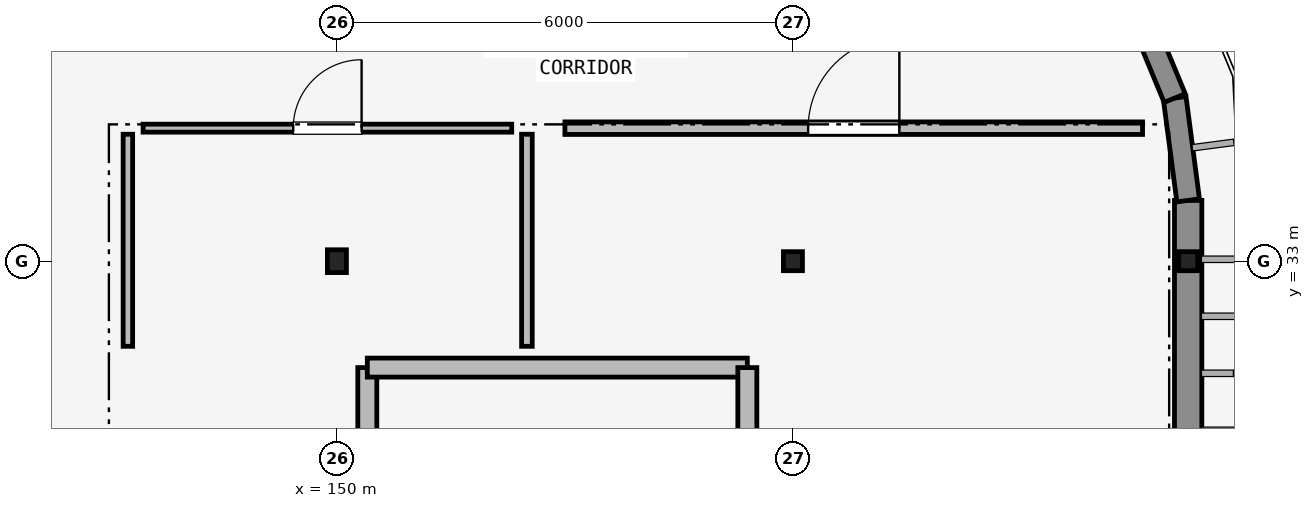
"""IFC4 building model, lengths in metres.
Left out: names, types, materials, properties, quantities, classifications, styles, units other than length and angle.
Written with IfcOpenShell. Run it as: python <this file> out.ifc"""

import sys

from ifc_helpers import new_model, si_unit, direction, frame, frame_2d, origin, origin_2d, place, context, subcontext, project, spatial, rectangle, hollow_rectangle, i_section, extrude, element, fill, save


model = new_model("IFC4")
c1 = context("Model", 3, precision=1e-05, world=origin(), true_north=direction((0.0, 1.0)))
c2 = subcontext(c1, "Body", "Model", "MODEL_VIEW")
j1 = project(units=[si_unit("LENGTHUNIT", "METRE"), si_unit("PLANEANGLEUNIT", "RADIAN")], contexts=[c1])
p1 = place(None, origin())
s1 = spatial("IfcSite", under=j1, at=p1, CompositionType="ELEMENT")
p2 = place(p1, origin())
s2 = spatial("IfcBuilding", under=s1, at=p2, CompositionType="ELEMENT")
p3 = place(p2, frame((0.0, 0.0, 26.1)))
s3 = spatial("IfcBuildingStorey", under=s2, at=p3, CompositionType="ELEMENT", Elevation=26.1)
p4 = place(p3, frame((150.0, 33.0, 0.0), z_axis=(0.0, 0.0, 1.0), x_axis=(1.0, 0.0, 0.0)))
e1 = element("IfcColumn", 1, at=p4, inside=s3, PredefinedType="COLUMN", context=c2, shape_type="SweptSolid", body=[
    extrude(i_section(OverallWidth=0.25, OverallDepth=0.3, WebThickness=0.01, FlangeThickness=0.01, FilletRadius=0.012, at=origin_2d()), origin(), (0.0, 0.0, 1.0), 3.9),
])
for number, where, z_axis, x_axis in (
    (2, (156.0, 33.0, 0.0), (0.0, 0.0, 1.0), (1.0, 0.0, 0.0)),
    (3, (161.2, 33.0, 0.0), (0.0, 0.0, 1.0), (1.0, 0.0, 0.0)),
):
    element("IfcColumn", number, at=place(p3, frame(where, z_axis=z_axis, x_axis=x_axis)), inside=s3, PredefinedType="COLUMN", context=c2, shape_type="SweptSolid", body=[
        extrude(hollow_rectangle(XDim=0.25, YDim=0.25, WallThickness=0.012, InnerFilletRadius=0.012, OuterFilletRadius=0.024, at=origin_2d()), origin(), (0.0, 0.0, 1.0), 3.9),
    ])
p5 = place(p3, frame((161.2, 30.0, 0.0), z_axis=(0.0, 0.0, 1.0), x_axis=(0.0, 1.0, 0.0)))
e4 = element("IfcWall", 4, at=p5, inside=s3, PredefinedType="SOLIDWALL", context=c2, shape_type="SweptSolid", body=[
    extrude(rectangle(XDim=3.8, YDim=0.36, at=frame_2d((1.9, 0.0))), origin(), (0.0, 0.0, 1.0), 3.13),
])
p6 = place(p3, frame((161.2, 33.8, 0.0), z_axis=(0.0, 0.0, 1.0), x_axis=(-0.130561507967, 0.991440211328, 0.0)))
e5 = element("IfcWall", 5, at=p6, inside=s3, PredefinedType="SOLIDWALL", context=c2, shape_type="SweptSolid", body=[
    extrude(rectangle(XDim=1.358, YDim=0.3, at=frame_2d((0.679, 0.0))), origin(), (0.0, 0.0, 1.0), 3.28),
])
p7 = place(p3, frame((161.023, 35.146, 0.0), z_axis=(0.0, 0.0, 1.0), x_axis=(-0.382621882407, 0.923905024937, 0.0)))
e6 = element("IfcWall", 6, at=p7, inside=s3, PredefinedType="SOLIDWALL", context=c2, shape_type="SweptSolid", body=[
    extrude(rectangle(XDim=1.357, YDim=0.3, at=frame_2d((0.679, 0.0))), origin(), (0.0, 0.0, 1.0), 3.28),
])
p8 = place(p3, frame((150.4, 26.55, 0.0), z_axis=(0.0, 0.0, 1.0), x_axis=(0.0, 1.0, 0.0)))
e7 = element("IfcWall", 7, at=p8, inside=s3, PredefinedType="PARTITIONING", context=c2, shape_type="SweptSolid", body=[
    extrude(rectangle(XDim=5.05, YDim=0.25, at=frame_2d((2.525, 0.0))), origin(), (0.0, 0.0, 1.0), 3.08),
])
p9 = place(p8, frame((1.775, 0.0, 0.0)))
e8 = element("IfcOpeningElement", 8, at=p9, cuts=e7, PredefinedType="OPENING", context=c2, shape_type="SweptSolid", body=[
    extrude(rectangle(XDim=1.5, YDim=2.15, at=frame_2d((0.75, 1.075))), frame((0.0, 0.135, 0.0), z_axis=(0.0, -1.0, 0.0), x_axis=(1.0, 0.0, 0.0)), (0.0, 0.0, 1.0), 0.27),
])
p10 = place(p3, frame((150.4, 31.6, 0.0), z_axis=(0.0, 0.0, 1.0), x_axis=(1.0, 0.0, 0.0)))
e9 = element("IfcWall", 9, at=p10, inside=s3, PredefinedType="PARTITIONING", context=c2, shape_type="SweptSolid", body=[
    extrude(rectangle(XDim=5.0, YDim=0.25, at=frame_2d((2.5, 0.0))), origin(), (0.0, 0.0, 1.0), 3.28),
])
p11 = place(p3, frame((155.4, 30.4, 0.0), z_axis=(0.0, 0.0, 1.0), x_axis=(0.0, 1.0, 0.0)))
e10 = element("IfcWall", 10, at=p11, inside=s3, PredefinedType="PARTITIONING", context=c2, shape_type="SweptSolid", body=[
    extrude(rectangle(XDim=1.2, YDim=0.25, at=frame_2d((0.6, 0.0))), origin(), (0.0, 0.0, 1.0), 3.68),
])
p12 = place(p3, frame((147.45, 34.75, 0.0), z_axis=(0.0, 0.0, 1.0), x_axis=(1.0, 0.0, 0.0)))
e11 = element("IfcWall", 11, at=p12, inside=s3, PredefinedType="PARTITIONING", context=c2, shape_type="SweptSolid", body=[
    extrude(rectangle(XDim=4.85, YDim=0.105, at=frame_2d((2.425, 0.0))), origin(), (0.0, 0.0, 1.0), 3.28),
])
p13 = place(p12, frame((1.975, 0.0, 0.0)))
e12 = element("IfcOpeningElement", 12, at=p13, cuts=e11, PredefinedType="OPENING", context=c2, shape_type="SweptSolid", body=[
    extrude(rectangle(XDim=0.9, YDim=2.1, at=frame_2d((0.45, 1.05))), frame((0.0, 0.062, 0.0), z_axis=(0.0, -1.0, 0.0), x_axis=(1.0, 0.0, 0.0)), (0.0, 0.0, 1.0), 0.125),
])
p14 = place(p3, frame((153.0, 34.75, 0.0), z_axis=(0.0, 0.0, 1.0), x_axis=(1.0, 0.0, 0.0)))
e13 = element("IfcWall", 13, at=p14, inside=s3, PredefinedType="PARTITIONING", context=c2, shape_type="SweptSolid", body=[
    extrude(rectangle(XDim=7.6, YDim=0.165, at=frame_2d((3.8, 0.0))), origin(), (0.0, 0.0, 1.0), 3.28),
])
p15 = place(p14, frame((3.2, 0.0, 0.0)))
e14 = element("IfcOpeningElement", 14, at=p15, cuts=e13, PredefinedType="OPENING", context=c2, shape_type="SweptSolid", body=[
    extrude(rectangle(XDim=1.2, YDim=2.15, at=frame_2d((0.6, 1.075))), frame((0.0, 0.093, 0.0), z_axis=(0.0, -1.0, 0.0), x_axis=(1.0, 0.0, 0.0)), (0.0, 0.0, 1.0), 0.185),
])
p16 = place(p3, frame((152.5, 34.67, 0.0), z_axis=(0.0, 0.0, 1.0), x_axis=(0.0, -1.0, 0.0)))
e15 = element("IfcWall", 15, at=p16, inside=s3, PredefinedType="PARTITIONING", context=c2, shape_type="SweptSolid", body=[
    extrude(rectangle(XDim=2.79, YDim=0.14, at=frame_2d((1.395, 0.0))), origin(), (0.0, 0.0, 1.0), 3.08),
])
p17 = place(p3, frame((147.25, 31.88, 0.0), z_axis=(0.0, 0.0, 1.0), x_axis=(0.0, 1.0, 0.0)))
e16 = element("IfcWall", 16, at=p17, inside=s3, PredefinedType="PARTITIONING", context=c2, shape_type="SweptSolid", body=[
    extrude(rectangle(XDim=2.79, YDim=0.125, at=frame_2d((1.395, 0.0))), origin(), (0.0, 0.0, 1.0), 3.18),
])
p18 = place(p13, origin())
e17 = element("IfcDoor", 17, at=p18, inside=s3, OperationType="SINGLE_SWING_RIGHT", PredefinedType="DOOR", context=c2, shape_type="SweptSolid", body=[
    extrude(rectangle(XDim=0.9, YDim=2.1, at=frame_2d((0.45, 1.05))), frame((0.0, 0.025, 0.0), z_axis=(0.0, -1.0, 0.0), x_axis=(1.0, 0.0, 0.0)), (0.0, 0.0, 1.0), 0.05),
])
fill(e12, e17)
p19 = place(p15, origin())
e18 = element("IfcDoor", 18, at=p19, inside=s3, OperationType="SINGLE_SWING_RIGHT", PredefinedType="DOOR", context=c2, shape_type="SweptSolid", body=[
    extrude(rectangle(XDim=1.2, YDim=2.15, at=frame_2d((0.6, 1.075))), frame((0.0, 0.025, 0.0), z_axis=(0.0, -1.0, 0.0), x_axis=(1.0, 0.0, 0.0)), (0.0, 0.0, 1.0), 0.05),
])
fill(e14, e18)
save(model, sys.argv[1])
